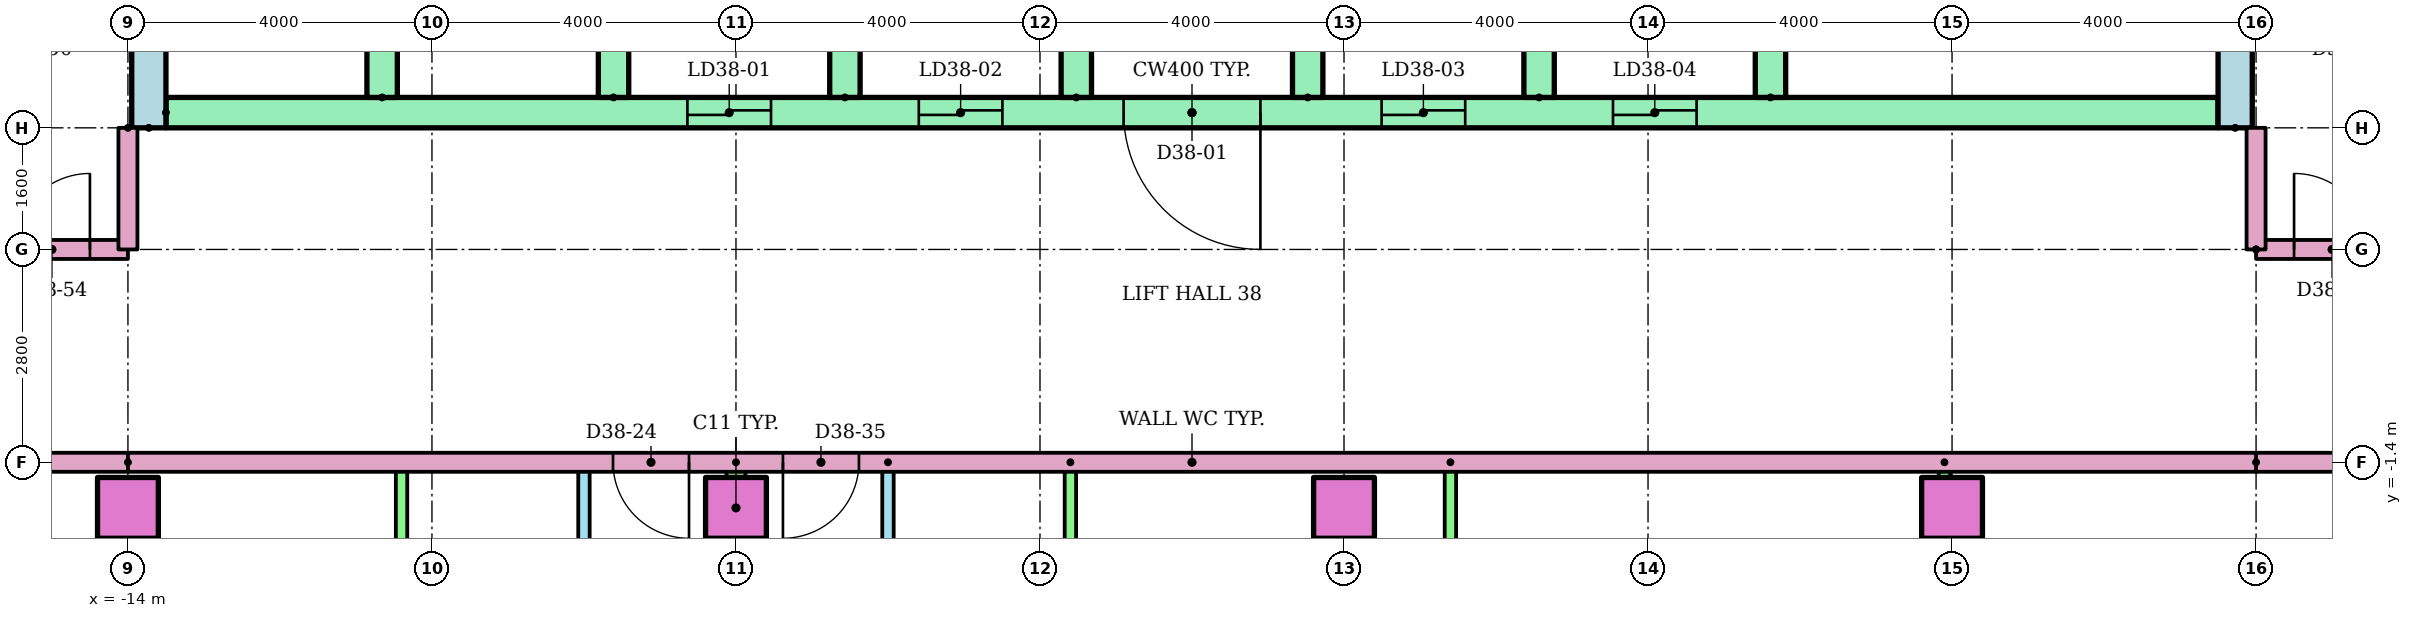
"""IFC4 building model, lengths in metres.
Left out: names, types, materials, properties, quantities, classifications, styles, units other than length and angle.
Written with IfcOpenShell. Run it as: python <this file> out.ifc"""

import sys

from ifc_helpers import new_model, si_unit, direction, frame, frame_2d, origin, origin_2d, place, context, subcontext, project, spatial, rectangle, extrude, element, fill, save


model = new_model("IFC4")
c1 = context("Model", 3, precision=1e-05, world=origin(), true_north=direction((0.0, 1.0)))
c2 = subcontext(c1, "Body", "Model", "MODEL_VIEW")
j1 = project(units=[si_unit("LENGTHUNIT", "METRE"), si_unit("PLANEANGLEUNIT", "RADIAN")], contexts=[c1])
p1 = place(None, origin())
s1 = spatial("IfcSite", under=j1, at=p1, CompositionType="ELEMENT")
p2 = place(p1, origin())
s2 = spatial("IfcBuilding", under=s1, at=p2, CompositionType="ELEMENT")
p3 = place(p2, frame((0.0, 0.0, 145.4)))
s3 = spatial("IfcBuildingStorey", under=s2, at=p3, CompositionType="ELEMENT", Elevation=145.4)
for number, where in (
    (1, (-14.0, -2.0, 0.0)),
    (2, (-6.0, -2.0, 0.0)),
    (3, (2.0, -2.0, 0.0)),
    (4, (10.0, -2.0, 0.0)),
):
    element("IfcColumn", number, at=place(p3, frame(where)), inside=s3, PredefinedType="COLUMN", context=c2, shape_type="SweptSolid", body=[
        extrude(rectangle(XDim=0.8, YDim=0.8, at=origin_2d()), origin(), (0.0, 0.0, 1.0), 3.2),
    ])
for number, where, z_axis, x_axis in (
    (5, (-13.725, 3.0, 0.0), (0.0, 0.0, 1.0), (0.0, 1.0, 0.0)),
    (6, (13.725, 3.0, 0.0), (0.0, 0.0, 1.0), (0.0, 1.0, 0.0)),
):
    element("IfcWall", number, at=place(p3, frame(where, z_axis=z_axis, x_axis=x_axis)), inside=s3, PredefinedType="SHEAR", context=c2, shape_type="SweptSolid", body=[
        extrude(rectangle(XDim=17.0, YDim=0.45, at=frame_2d((8.5, 0.0))), origin(), (0.0, 0.0, 1.0), 2.92),
    ])
p4 = place(p3, frame((-13.5, 3.2, 0.0)))
e7 = element("IfcWall", 7, at=p4, inside=s3, PredefinedType="SHEAR", context=c2, shape_type="SweptSolid", body=[
    extrude(rectangle(XDim=27.0, YDim=0.4, at=frame_2d((13.5, 0.0))), origin(), (0.0, 0.0, 1.0), 2.92),
])
p5 = place(p4, frame((6.861, 0.0, 0.0)))
e8 = element("IfcOpeningElement", 8, at=p5, cuts=e7, PredefinedType="OPENING", context=c2, shape_type="SweptSolid", body=[
    extrude(rectangle(XDim=1.1, YDim=2.1, at=frame_2d((0.55, 1.05))), frame((0.0, 0.21, 0.0), z_axis=(0.0, -1.0, 0.0), x_axis=(1.0, 0.0, 0.0)), (0.0, 0.0, 1.0), 0.42),
])
p6 = place(p4, frame((9.906, 0.0, 0.0)))
e9 = element("IfcOpeningElement", 9, at=p6, cuts=e7, PredefinedType="OPENING", context=c2, shape_type="SweptSolid", body=[
    extrude(rectangle(XDim=1.1, YDim=2.1, at=frame_2d((0.55, 1.05))), frame((0.0, 0.21, 0.0), z_axis=(0.0, -1.0, 0.0), x_axis=(1.0, 0.0, 0.0)), (0.0, 0.0, 1.0), 0.42),
])
p7 = place(p4, frame((15.994, 0.0, 0.0)))
e10 = element("IfcOpeningElement", 10, at=p7, cuts=e7, PredefinedType="OPENING", context=c2, shape_type="SweptSolid", body=[
    extrude(rectangle(XDim=1.1, YDim=2.1, at=frame_2d((0.55, 1.05))), frame((0.0, 0.21, 0.0), z_axis=(0.0, -1.0, 0.0), x_axis=(1.0, 0.0, 0.0)), (0.0, 0.0, 1.0), 0.42),
])
p8 = place(p4, frame((19.039, 0.0, 0.0)))
e11 = element("IfcOpeningElement", 11, at=p8, cuts=e7, PredefinedType="OPENING", context=c2, shape_type="SweptSolid", body=[
    extrude(rectangle(XDim=1.1, YDim=2.1, at=frame_2d((0.55, 1.05))), frame((0.0, 0.21, 0.0), z_axis=(0.0, -1.0, 0.0), x_axis=(1.0, 0.0, 0.0)), (0.0, 0.0, 1.0), 0.42),
])
p9 = place(p4, frame((12.6, 0.0, 0.0)))
e12 = element("IfcOpeningElement", 12, at=p9, cuts=e7, PredefinedType="OPENING", context=c2, shape_type="SweptSolid", body=[
    extrude(rectangle(XDim=1.8, YDim=2.1, at=frame_2d((0.9, 1.05))), frame((0.0, 0.21, 0.0), z_axis=(0.0, -1.0, 0.0), x_axis=(1.0, 0.0, 0.0)), (0.0, 0.0, 1.0), 0.42),
])
for number, where, z_axis, x_axis in (
    (13, (-10.656, 3.4, 0.0), (0.0, 0.0, 1.0), (0.0, 1.0, 0.0)),
    (14, (-7.611, 3.4, 0.0), (0.0, 0.0, 1.0), (0.0, 1.0, 0.0)),
    (15, (-4.567, 3.4, 0.0), (0.0, 0.0, 1.0), (0.0, 1.0, 0.0)),
    (16, (-1.522, 3.4, 0.0), (0.0, 0.0, 1.0), (0.0, 1.0, 0.0)),
    (17, (1.522, 3.4, 0.0), (0.0, 0.0, 1.0), (0.0, 1.0, 0.0)),
    (18, (4.567, 3.4, 0.0), (0.0, 0.0, 1.0), (0.0, 1.0, 0.0)),
    (19, (7.611, 3.4, 0.0), (0.0, 0.0, 1.0), (0.0, 1.0, 0.0)),
):
    element("IfcWall", number, at=place(p3, frame(where, z_axis=z_axis, x_axis=x_axis)), inside=s3, PredefinedType="SHEAR", context=c2, shape_type="SweptSolid", body=[
        extrude(rectangle(XDim=3.0, YDim=0.4, at=frame_2d((1.5, 0.0))), origin(), (0.0, 0.0, 1.0), 2.92),
    ])
p10 = place(p3, frame((-8.0, -8.4, 0.0), z_axis=(0.0, 0.0, 1.0), x_axis=(0.0, 1.0, 0.0)))
e20 = element("IfcWall", 20, at=p10, inside=s3, PredefinedType="PARTITIONING", context=c2, shape_type="SweptSolid", body=[
    extrude(rectangle(XDim=7.0, YDim=0.15, at=frame_2d((3.5, 0.0))), origin(), (0.0, 0.0, 1.0), 2.4),
])
p11 = place(p10, frame((4.675, 0.0, 0.0)))
e21 = element("IfcOpeningElement", 21, at=p11, cuts=e20, PredefinedType="OPENING", context=c2, shape_type="SweptSolid", body=[
    extrude(rectangle(XDim=0.9, YDim=2.1, at=frame_2d((0.45, 1.05))), frame((0.0, 0.085, 0.0), z_axis=(0.0, -1.0, 0.0), x_axis=(1.0, 0.0, 0.0)), (0.0, 0.0, 1.0), 0.17),
])
p12 = place(p10, frame((1.225, 0.0, 0.0)))
e22 = element("IfcOpeningElement", 22, at=p12, cuts=e20, PredefinedType="OPENING", context=c2, shape_type="SweptSolid", body=[
    extrude(rectangle(XDim=0.8, YDim=2.1, at=frame_2d((0.4, 1.05))), frame((0.0, 0.085, 0.0), z_axis=(0.0, -1.0, 0.0), x_axis=(1.0, 0.0, 0.0)), (0.0, 0.0, 1.0), 0.17),
])
p13 = place(p3, frame((-10.4, -8.4, 0.0), z_axis=(0.0, 0.0, 1.0), x_axis=(0.0, 1.0, 0.0)))
e23 = element("IfcWall", 23, at=p13, inside=s3, PredefinedType="PARTITIONING", context=c2, shape_type="SweptSolid", body=[
    extrude(rectangle(XDim=7.0, YDim=0.15, at=frame_2d((3.5, 0.0))), origin(), (0.0, 0.0, 1.0), 2.4),
])
p14 = place(p3, frame((-4.0, -1.4, 0.0), z_axis=(0.0, 0.0, 1.0), x_axis=(0.0, -1.0, 0.0)))
e24 = element("IfcWall", 24, at=p14, inside=s3, PredefinedType="PARTITIONING", context=c2, shape_type="SweptSolid", body=[
    extrude(rectangle(XDim=7.0, YDim=0.15, at=frame_2d((3.5, 0.0))), origin(), (0.0, 0.0, 1.0), 2.4),
])
p15 = place(p14, frame((1.425, 0.0, 0.0)))
e25 = element("IfcOpeningElement", 25, at=p15, cuts=e24, PredefinedType="OPENING", context=c2, shape_type="SweptSolid", body=[
    extrude(rectangle(XDim=0.9, YDim=2.1, at=frame_2d((0.45, 1.05))), frame((0.0, 0.085, 0.0), z_axis=(0.0, -1.0, 0.0), x_axis=(1.0, 0.0, 0.0)), (0.0, 0.0, 1.0), 0.17),
])
p16 = place(p14, frame((4.975, 0.0, 0.0)))
e26 = element("IfcOpeningElement", 26, at=p16, cuts=e24, PredefinedType="OPENING", context=c2, shape_type="SweptSolid", body=[
    extrude(rectangle(XDim=0.8, YDim=2.1, at=frame_2d((0.4, 1.05))), frame((0.0, 0.085, 0.0), z_axis=(0.0, -1.0, 0.0), x_axis=(1.0, 0.0, 0.0)), (0.0, 0.0, 1.0), 0.17),
])
for number, where, z_axis, x_axis in (
    (27, (-1.6, -1.4, 0.0), (0.0, 0.0, 1.0), (0.0, -1.0, 0.0)),
    (28, (3.4, -1.4, 0.0), (0.0, 0.0, 1.0), (0.0, -1.0, 0.0)),
    (29, (9.9, -1.4, 0.0), (0.0, 0.0, 1.0), (0.0, -1.0, 0.0)),
):
    element("IfcWall", number, at=place(p3, frame(where, z_axis=z_axis, x_axis=x_axis)), inside=s3, PredefinedType="PARTITIONING", context=c2, shape_type="SweptSolid", body=[
        extrude(rectangle(XDim=7.0, YDim=0.15, at=frame_2d((3.5, 0.0))), origin(), (0.0, 0.0, 1.0), 2.4),
    ])
p17 = place(p3, frame((-6.0, -1.4, 0.0), z_axis=(0.0, 0.0, 1.0), x_axis=(0.0, -1.0, 0.0)))
e30 = element("IfcWall", 30, at=p17, inside=s3, PredefinedType="PARTITIONING", context=c2, shape_type="SweptSolid", body=[
    extrude(rectangle(XDim=14.91, YDim=0.25, at=frame_2d((7.455, 0.0))), origin(), (0.0, 0.0, 1.0), 2.4),
])
p18 = place(p3, frame((-14.0, -1.4, 0.0), z_axis=(0.0, 0.0, 1.0), x_axis=(-1.0, 0.0, 0.0)))
e31 = element("IfcWall", 31, at=p18, inside=s3, PredefinedType="PARTITIONING", context=c2, shape_type="SweptSolid", body=[
    extrude(rectangle(XDim=15.0, YDim=0.25, at=frame_2d((7.5, 0.0))), origin(), (0.0, 0.0, 1.0), 2.4),
])
p19 = place(p3, frame((29.0, -1.4, 0.0), z_axis=(0.0, 0.0, 1.0), x_axis=(-1.0, 0.0, 0.0)))
e32 = element("IfcWall", 32, at=p19, inside=s3, PredefinedType="PARTITIONING", context=c2, shape_type="SweptSolid", body=[
    extrude(rectangle(XDim=15.0, YDim=0.25, at=frame_2d((7.5, 0.0))), origin(), (0.0, 0.0, 1.0), 2.4),
])
p20 = place(p19, frame((9.382, 0.0, 0.0)))
e33 = element("IfcOpeningElement", 33, at=p20, cuts=e32, PredefinedType="OPENING", context=c2, shape_type="SweptSolid", body=[
    extrude(rectangle(XDim=1.0, YDim=2.1, at=frame_2d((0.5, 1.05))), frame((0.0, 0.135, 0.0), z_axis=(0.0, -1.0, 0.0), x_axis=(1.0, 0.0, 0.0)), (0.0, 0.0, 1.0), 0.27),
])
p21 = place(p3, frame((-29.0, 1.4, 0.0)))
e34 = element("IfcWall", 34, at=p21, inside=s3, PredefinedType="PARTITIONING", context=c2, shape_type="SweptSolid", body=[
    extrude(rectangle(XDim=15.0, YDim=0.25, at=frame_2d((7.5, 0.0))), origin(), (0.0, 0.0, 1.0), 2.4),
])
p22 = place(p21, frame((5.382, 0.0, 0.0)))
e35 = element("IfcOpeningElement", 35, at=p22, cuts=e34, PredefinedType="OPENING", context=c2, shape_type="SweptSolid", body=[
    extrude(rectangle(XDim=1.0, YDim=2.1, at=frame_2d((0.5, 1.05))), frame((0.0, 0.135, 0.0), z_axis=(0.0, -1.0, 0.0), x_axis=(1.0, 0.0, 0.0)), (0.0, 0.0, 1.0), 0.27),
])
p23 = place(p21, frame((13.5, 0.0, 0.0)))
e36 = element("IfcOpeningElement", 36, at=p23, cuts=e34, PredefinedType="OPENING", context=c2, shape_type="SweptSolid", body=[
    extrude(rectangle(XDim=1.0, YDim=2.1, at=frame_2d((0.5, 1.05))), frame((0.0, 0.135, 0.0), z_axis=(0.0, -1.0, 0.0), x_axis=(1.0, 0.0, 0.0)), (0.0, 0.0, 1.0), 0.27),
])
p24 = place(p3, frame((14.0, 1.4, 0.0)))
e37 = element("IfcWall", 37, at=p24, inside=s3, PredefinedType="PARTITIONING", context=c2, shape_type="SweptSolid", body=[
    extrude(rectangle(XDim=15.0, YDim=0.25, at=frame_2d((7.5, 0.0))), origin(), (0.0, 0.0, 1.0), 2.4),
])
p25 = place(p24, frame((0.5, 0.0, 0.0)))
e38 = element("IfcOpeningElement", 38, at=p25, cuts=e37, PredefinedType="OPENING", context=c2, shape_type="SweptSolid", body=[
    extrude(rectangle(XDim=1.0, YDim=2.1, at=frame_2d((0.5, 1.05))), frame((0.0, 0.135, 0.0), z_axis=(0.0, -1.0, 0.0), x_axis=(1.0, 0.0, 0.0)), (0.0, 0.0, 1.0), 0.27),
])
p26 = place(p3, frame((14.0, -1.4, 0.0), z_axis=(0.0, 0.0, 1.0), x_axis=(-1.0, 0.0, 0.0)))
e39 = element("IfcWall", 39, at=p26, inside=s3, PredefinedType="PARTITIONING", context=c2, shape_type="SweptSolid", body=[
    extrude(rectangle(XDim=28.0, YDim=0.25, at=frame_2d((14.0, 0.0))), origin(), (0.0, 0.0, 1.0), 2.4),
])
p27 = place(p26, frame((20.618, 0.0, 0.0)))
e40 = element("IfcOpeningElement", 40, at=p27, cuts=e39, PredefinedType="OPENING", context=c2, shape_type="SweptSolid", body=[
    extrude(rectangle(XDim=1.0, YDim=2.1, at=frame_2d((0.5, 1.05))), frame((0.0, 0.135, 0.0), z_axis=(0.0, -1.0, 0.0), x_axis=(1.0, 0.0, 0.0)), (0.0, 0.0, 1.0), 0.27),
])
p28 = place(p26, frame((18.382, 0.0, 0.0)))
e41 = element("IfcOpeningElement", 41, at=p28, cuts=e39, PredefinedType="OPENING", context=c2, shape_type="SweptSolid", body=[
    extrude(rectangle(XDim=1.0, YDim=2.1, at=frame_2d((0.5, 1.05))), frame((0.0, 0.135, 0.0), z_axis=(0.0, -1.0, 0.0), x_axis=(1.0, 0.0, 0.0)), (0.0, 0.0, 1.0), 0.27),
])
for number, where, z_axis, x_axis in (
    (42, (-14.0, 3.0, 0.0), (0.0, 0.0, 1.0), (0.0, -1.0, 0.0)),
    (43, (14.0, 1.4, 0.0), (0.0, 0.0, 1.0), (0.0, 1.0, 0.0)),
):
    element("IfcWall", number, at=place(p3, frame(where, z_axis=z_axis, x_axis=x_axis)), inside=s3, PredefinedType="PARTITIONING", context=c2, shape_type="SweptSolid", body=[
        extrude(rectangle(XDim=1.6, YDim=0.25, at=frame_2d((0.8, 0.0))), origin(), (0.0, 0.0, 1.0), 2.4),
    ])
p29 = place(p5, origin())
e44 = element("IfcDoor", 44, at=p29, inside=s3, OperationType="SLIDING_TO_LEFT", PredefinedType="DOOR", context=c2, shape_type="SweptSolid", body=[
    extrude(rectangle(XDim=1.1, YDim=2.1, at=frame_2d((0.55, 1.05))), frame((0.0, 0.025, 0.0), z_axis=(0.0, -1.0, 0.0), x_axis=(1.0, 0.0, 0.0)), (0.0, 0.0, 1.0), 0.05),
])
fill(e8, e44)
p30 = place(p6, origin())
e45 = element("IfcDoor", 45, at=p30, inside=s3, OperationType="SLIDING_TO_LEFT", PredefinedType="DOOR", context=c2, shape_type="SweptSolid", body=[
    extrude(rectangle(XDim=1.1, YDim=2.1, at=frame_2d((0.55, 1.05))), frame((0.0, 0.025, 0.0), z_axis=(0.0, -1.0, 0.0), x_axis=(1.0, 0.0, 0.0)), (0.0, 0.0, 1.0), 0.05),
])
fill(e9, e45)
p31 = place(p7, origin())
e46 = element("IfcDoor", 46, at=p31, inside=s3, OperationType="SLIDING_TO_LEFT", PredefinedType="DOOR", context=c2, shape_type="SweptSolid", body=[
    extrude(rectangle(XDim=1.1, YDim=2.1, at=frame_2d((0.55, 1.05))), frame((0.0, 0.025, 0.0), z_axis=(0.0, -1.0, 0.0), x_axis=(1.0, 0.0, 0.0)), (0.0, 0.0, 1.0), 0.05),
])
fill(e10, e46)
p32 = place(p8, origin())
e47 = element("IfcDoor", 47, at=p32, inside=s3, OperationType="SLIDING_TO_LEFT", PredefinedType="DOOR", context=c2, shape_type="SweptSolid", body=[
    extrude(rectangle(XDim=1.1, YDim=2.1, at=frame_2d((0.55, 1.05))), frame((0.0, 0.025, 0.0), z_axis=(0.0, -1.0, 0.0), x_axis=(1.0, 0.0, 0.0)), (0.0, 0.0, 1.0), 0.05),
])
fill(e11, e47)
p33 = place(p9, frame((1.8, 0.0, 0.0), z_axis=(0.0, 0.0, 1.0), x_axis=(-1.0, 0.0, 0.0)))
e48 = element("IfcDoor", 48, at=p33, inside=s3, OperationType="DOUBLE_DOOR_SINGLE_SWING", PredefinedType="DOOR", context=c2, shape_type="SweptSolid", body=[
    extrude(rectangle(XDim=1.8, YDim=2.1, at=frame_2d((0.9, 1.05))), frame((0.0, 0.025, 0.0), z_axis=(0.0, -1.0, 0.0), x_axis=(1.0, 0.0, 0.0)), (0.0, 0.0, 1.0), 0.05),
])
fill(e12, e48)
p34 = place(p27, origin())
e49 = element("IfcDoor", 49, at=p34, inside=s3, OperationType="SINGLE_SWING_LEFT", PredefinedType="DOOR", context=c2, shape_type="SweptSolid", body=[
    extrude(rectangle(XDim=1.0, YDim=2.1, at=frame_2d((0.5, 1.05))), frame((0.0, 0.025, 0.0), z_axis=(0.0, -1.0, 0.0), x_axis=(1.0, 0.0, 0.0)), (0.0, 0.0, 1.0), 0.05),
])
fill(e40, e49)
p35 = place(p28, origin())
e50 = element("IfcDoor", 50, at=p35, inside=s3, OperationType="SINGLE_SWING_RIGHT", PredefinedType="DOOR", context=c2, shape_type="SweptSolid", body=[
    extrude(rectangle(XDim=1.0, YDim=2.1, at=frame_2d((0.5, 1.05))), frame((0.0, 0.025, 0.0), z_axis=(0.0, -1.0, 0.0), x_axis=(1.0, 0.0, 0.0)), (0.0, 0.0, 1.0), 0.05),
])
fill(e41, e50)
p36 = place(p23, origin())
e51 = element("IfcDoor", 51, at=p36, inside=s3, OperationType="SINGLE_SWING_RIGHT", PredefinedType="DOOR", context=c2, shape_type="SweptSolid", body=[
    extrude(rectangle(XDim=1.0, YDim=2.1, at=frame_2d((0.5, 1.05))), frame((0.0, 0.025, 0.0), z_axis=(0.0, -1.0, 0.0), x_axis=(1.0, 0.0, 0.0)), (0.0, 0.0, 1.0), 0.05),
])
fill(e36, e51)
p37 = place(p25, origin())
e52 = element("IfcDoor", 52, at=p37, inside=s3, OperationType="SINGLE_SWING_LEFT", PredefinedType="DOOR", context=c2, shape_type="SweptSolid", body=[
    extrude(rectangle(XDim=1.0, YDim=2.1, at=frame_2d((0.5, 1.05))), frame((0.0, 0.025, 0.0), z_axis=(0.0, -1.0, 0.0), x_axis=(1.0, 0.0, 0.0)), (0.0, 0.0, 1.0), 0.05),
])
fill(e38, e52)
save(model, sys.argv[1])
